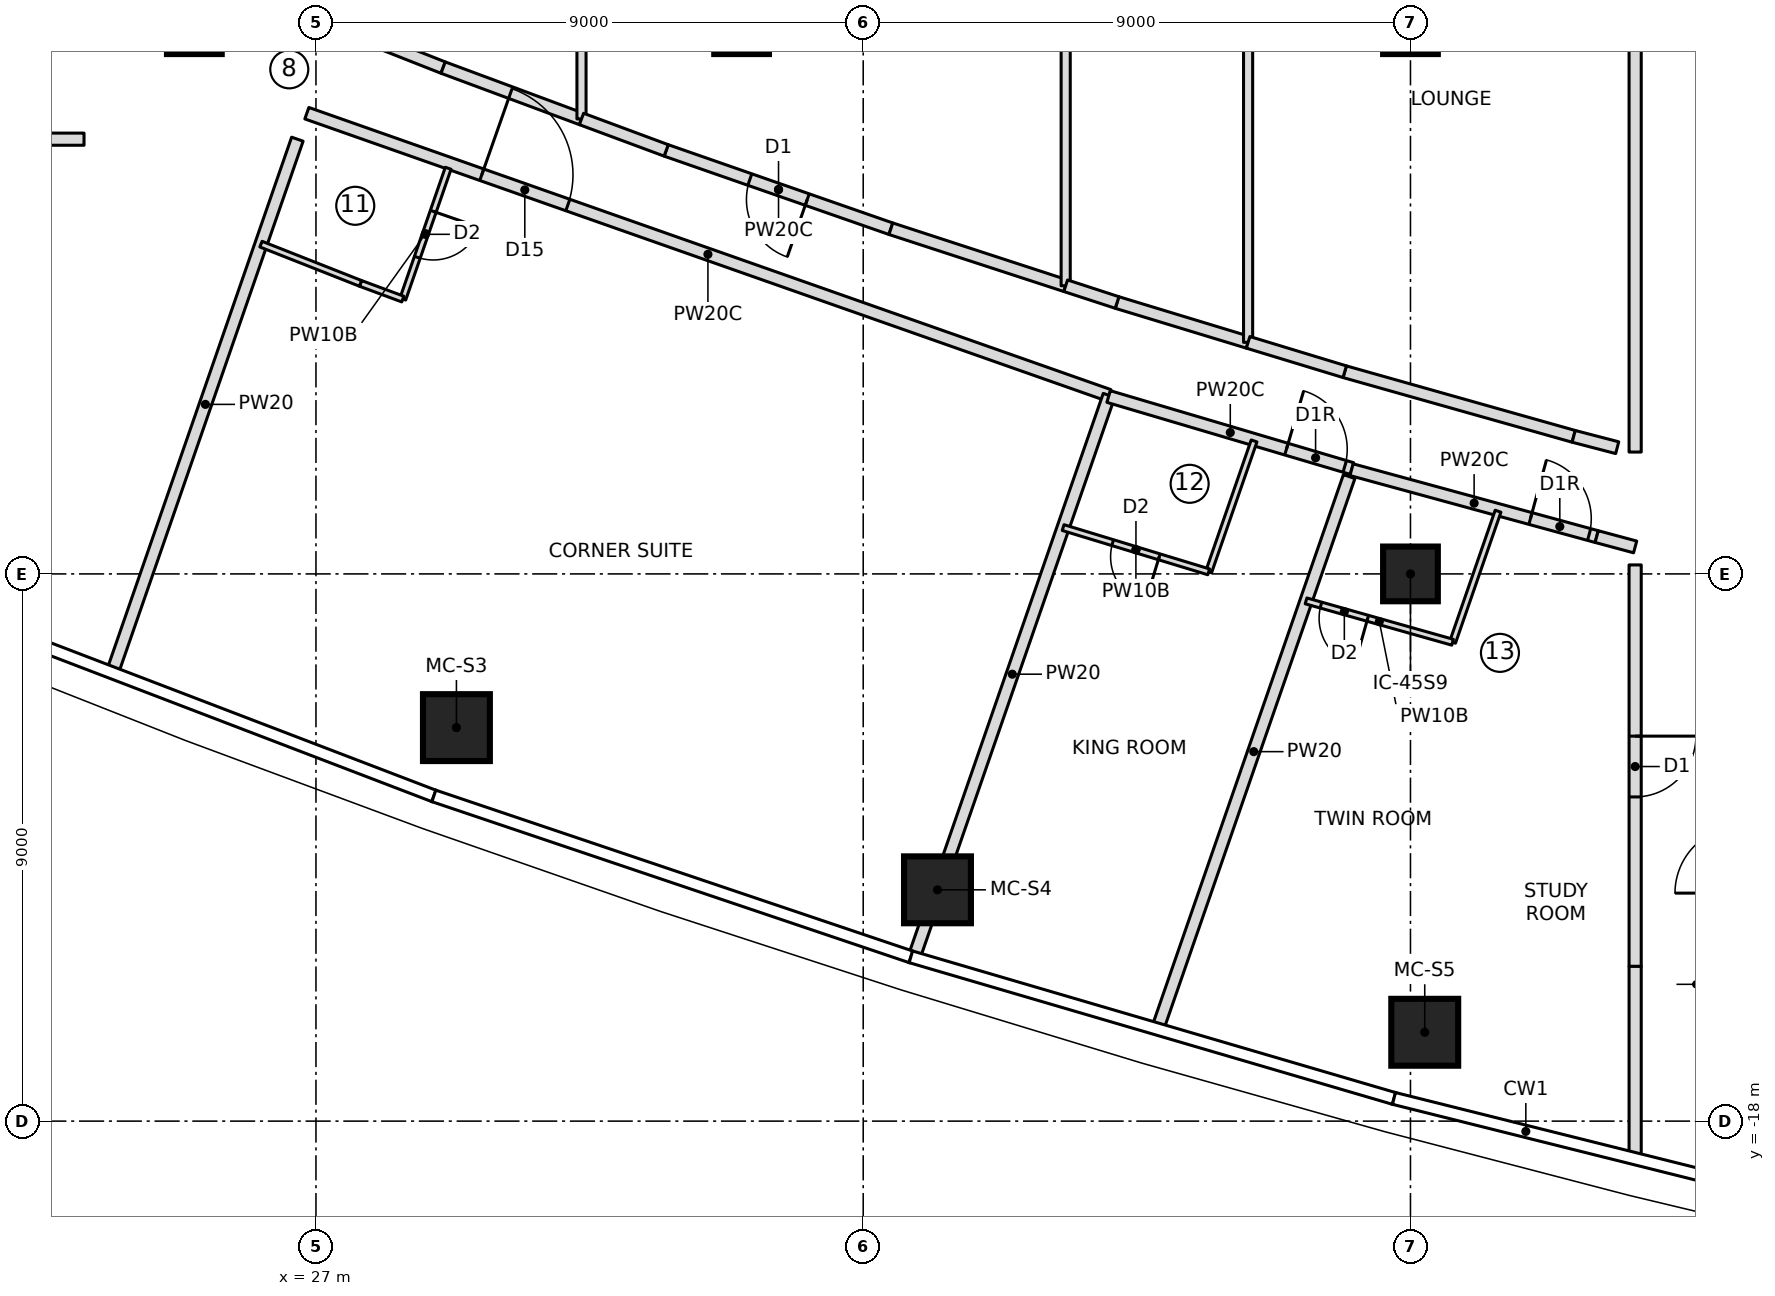
"""IFC4 building model, lengths in metres.
Left out: names, types, materials, properties, quantities, classifications, styles, units other than length and angle.
Written with IfcOpenShell. Run it as: python <this file> out.ifc"""

import sys

from ifc_helpers import new_model, si_unit, direction, frame, frame_2d, origin, origin_2d, place, context, subcontext, project, spatial, rectangle, extrude, element, fill, save


model = new_model("IFC4")
c1 = context("Model", 3, precision=1e-05, world=origin(), true_north=direction((0.0, 1.0)))
c2 = subcontext(c1, "Body", "Model", "MODEL_VIEW")
j1 = project(units=[si_unit("LENGTHUNIT", "METRE"), si_unit("PLANEANGLEUNIT", "RADIAN")], contexts=[c1])
p1 = place(None, origin())
s1 = spatial("IfcSite", under=j1, at=p1, CompositionType="ELEMENT")
p2 = place(p1, origin())
s2 = spatial("IfcBuilding", under=s1, at=p2, CompositionType="ELEMENT")
p3 = place(p2, frame((0.0, 0.0, 267.9)))
s3 = spatial("IfcBuildingStorey", under=s2, at=p3, CompositionType="ELEMENT", Elevation=267.9)
for number, where, z_axis, x_axis in (
    (1, (29.31, -11.528, 0.0), (0.0, 0.0, 1.0), (1.0, 0.0, 0.0)),
    (2, (37.221, -14.196, 0.0), (0.0, 0.0, 1.0), (1.0, 0.0, 0.0)),
    (3, (45.235, -16.539, 0.0), (0.0, 0.0, 1.0), (1.0, 0.0, 0.0)),
):
    element("IfcColumn", number, at=place(p3, frame(where, z_axis=z_axis, x_axis=x_axis)), inside=s3, PredefinedType="COLUMN", context=c2, shape_type="SweptSolid", body=[
        extrude(rectangle(XDim=1.1, YDim=1.1, at=origin_2d()), origin(), (0.0, 0.0, 1.0), 3.55),
    ])
for number, where, z_axis, x_axis in (
    (4, (25.0, 0.0, 0.0), (0.0, 0.0, 1.0), (1.0, 0.0, 0.0)),
    (5, (34.0, 0.0, 0.0), (0.0, 0.0, 1.0), (1.0, 0.0, 0.0)),
    (6, (45.0, -9.0, 0.0), (0.0, 0.0, 1.0), (1.0, 0.0, 0.0)),
    (7, (45.0, 0.0, 0.0), (0.0, 0.0, 1.0), (1.0, 0.0, 0.0)),
):
    element("IfcColumn", number, at=place(p3, frame(where, z_axis=z_axis, x_axis=x_axis)), inside=s3, PredefinedType="COLUMN", context=c2, shape_type="SweptSolid", body=[
        extrude(rectangle(XDim=0.9, YDim=0.9, at=origin_2d()), origin(), (0.0, 0.0, 1.0), 3.55),
    ])
p4 = place(p3, frame((7.287, -1.85, 0.0), z_axis=(0.0, 0.0, 1.0), x_axis=(1.0, 0.0, 0.0)))
e8 = element("IfcWall", 8, at=p4, inside=s3, PredefinedType="PARTITIONING", context=c2, shape_type="SweptSolid", body=[
    extrude(rectangle(XDim=15.899, YDim=0.2, at=frame_2d((7.949, 0.0))), origin(), (0.0, 0.0, 1.0), 3.25),
])
p5 = place(p4, frame((7.624, 0.0, 0.0)))
e9 = element("IfcOpeningElement", 9, at=p5, cuts=e8, PredefinedType="OPENING", context=c2, shape_type="SweptSolid", body=[
    extrude(rectangle(XDim=1.0, YDim=2.1, at=frame_2d((0.5, 1.05))), frame((0.0, 0.11, 0.0), z_axis=(0.0, -1.0, 0.0), x_axis=(1.0, 0.0, 0.0)), (0.0, 0.0, 1.0), 0.22),
])
p6 = place(p3, frame((23.668, -10.573, 0.0), z_axis=(0.0, 0.0, 1.0), x_axis=(0.327714422317, 0.944776829418, 0.0)))
e10 = element("IfcWall", 10, at=p6, inside=s3, PredefinedType="PARTITIONING", context=c2, shape_type="SweptSolid", body=[
    extrude(rectangle(XDim=9.233, YDim=0.2, at=frame_2d((4.617, 0.0))), origin(), (0.0, 0.0, 1.0), 3.25),
])
p7 = place(p3, frame((26.85, -1.423, 0.0), z_axis=(0.0, 0.0, 1.0), x_axis=(0.943328585164, -0.331860182022, 0.0)))
e11 = element("IfcWall", 11, at=p7, inside=s3, PredefinedType="PARTITIONING", context=c2, shape_type="SweptSolid", body=[
    extrude(rectangle(XDim=13.984, YDim=0.2, at=frame_2d((6.992, 0.0))), origin(), (0.0, 0.0, 1.0), 3.25),
])
p8 = place(p7, frame((3.05, 0.0, 0.0)))
e12 = element("IfcOpeningElement", 12, at=p8, cuts=e11, PredefinedType="OPENING", context=c2, shape_type="SweptSolid", body=[
    extrude(rectangle(XDim=1.5, YDim=2.1, at=frame_2d((0.75, 1.05))), frame((0.0, 0.11, 0.0), z_axis=(0.0, -1.0, 0.0), x_axis=(1.0, 0.0, 0.0)), (0.0, 0.0, 1.0), 0.22),
])
p9 = place(p3, frame((29.175, -2.328, 0.0), z_axis=(0.0, 0.0, 1.0), x_axis=(-0.327718024288, -0.944775579996, 0.0)))
e13 = element("IfcWall", 13, at=p9, inside=s3, PredefinedType="PARTITIONING", context=c2, shape_type="SweptSolid", body=[
    extrude(rectangle(XDim=2.277, YDim=0.1, at=frame_2d((1.139, 0.0))), origin(), (0.0, 0.0, 1.0), 3.25),
])
p10 = place(p9, frame((0.75, 0.0, 0.0)))
e14 = element("IfcOpeningElement", 14, at=p10, cuts=e13, PredefinedType="OPENING", context=c2, shape_type="SweptSolid", body=[
    extrude(rectangle(XDim=0.8, YDim=2.1, at=frame_2d((0.4, 1.05))), frame((0.0, 0.06, 0.0), z_axis=(0.0, -1.0, 0.0), x_axis=(1.0, 0.0, 0.0)), (0.0, 0.0, 1.0), 0.12),
])
p11 = place(p3, frame((28.428, -4.48, 0.0), z_axis=(0.0, 0.0, 1.0), x_axis=(-0.937514267289, 0.347946833049, 0.0)))
e15 = element("IfcWall", 15, at=p11, inside=s3, PredefinedType="PARTITIONING", context=c2, shape_type="SweptSolid", body=[
    extrude(rectangle(XDim=0.742, YDim=0.1, at=frame_2d((0.371, 0.0))), origin(), (0.0, 0.0, 1.0), 3.25),
])
p12 = place(p3, frame((27.733, -4.222, 0.0), z_axis=(0.0, 0.0, 1.0), x_axis=(-0.930254925629, 0.366913850028, 0.0)))
e16 = element("IfcWall", 16, at=p12, inside=s3, PredefinedType="PARTITIONING", context=c2, shape_type="SweptSolid", body=[
    extrude(rectangle(XDim=1.76, YDim=0.1, at=frame_2d((0.88, 0.0))), origin(), (0.0, 0.0, 1.0), 3.25),
])
p13 = place(p3, frame((36.861, -15.235, 0.0), z_axis=(0.0, 0.0, 1.0), x_axis=(0.327710853631, 0.944778067279, 0.0)))
e17 = element("IfcWall", 17, at=p13, inside=s3, PredefinedType="PARTITIONING", context=c2, shape_type="SweptSolid", body=[
    extrude(rectangle(XDim=9.707, YDim=0.2, at=frame_2d((4.854, 0.0))), origin(), (0.0, 0.0, 1.0), 3.25),
])
p14 = place(p3, frame((40.035, -6.083, 0.0), z_axis=(0.0, 0.0, 1.0), x_axis=(0.958901312153, -0.283739799027, 0.0)))
e18 = element("IfcWall", 18, at=p14, inside=s3, PredefinedType="PARTITIONING", context=c2, shape_type="SweptSolid", body=[
    extrude(rectangle(XDim=4.174, YDim=0.2, at=frame_2d((2.087, 0.0))), origin(), (0.0, 0.0, 1.0), 3.25),
])
p15 = place(p14, frame((3.05, 0.0, 0.0)))
e19 = element("IfcOpeningElement", 19, at=p15, cuts=e18, PredefinedType="OPENING", context=c2, shape_type="SweptSolid", body=[
    extrude(rectangle(XDim=1.0, YDim=2.1, at=frame_2d((0.5, 1.05))), frame((0.0, 0.11, 0.0), z_axis=(0.0, -1.0, 0.0), x_axis=(1.0, 0.0, 0.0)), (0.0, 0.0, 1.0), 0.22),
])
p16 = place(p3, frame((42.428, -6.813, 0.0), z_axis=(0.0, 0.0, 1.0), x_axis=(-0.327743427431, -0.944766767925, 0.0)))
e20 = element("IfcWall", 20, at=p16, inside=s3, PredefinedType="PARTITIONING", context=c2, shape_type="SweptSolid", body=[
    extrude(rectangle(XDim=2.279, YDim=0.1, at=frame_2d((1.139, 0.0))), origin(), (0.0, 0.0, 1.0), 3.25),
])
p17 = place(p3, frame((41.681, -8.966, 0.0), z_axis=(0.0, 0.0, 1.0), x_axis=(-0.956723503196, 0.290998519638, 0.0)))
e21 = element("IfcWall", 21, at=p17, inside=s3, PredefinedType="PARTITIONING", context=c2, shape_type="SweptSolid", body=[
    extrude(rectangle(XDim=2.502, YDim=0.1, at=frame_2d((1.251, 0.0))), origin(), (0.0, 0.0, 1.0), 3.25),
])
p18 = place(p17, frame((0.85, 0.0, 0.0)))
e22 = element("IfcOpeningElement", 22, at=p18, cuts=e21, PredefinedType="OPENING", context=c2, shape_type="SweptSolid", body=[
    extrude(rectangle(XDim=0.8, YDim=2.1, at=frame_2d((0.4, 1.05))), frame((0.0, 0.06, 0.0), z_axis=(0.0, -1.0, 0.0), x_axis=(1.0, 0.0, 0.0)), (0.0, 0.0, 1.0), 0.12),
])
p19 = place(p3, frame((40.854, -16.447, 0.0), z_axis=(0.0, 0.0, 1.0), x_axis=(0.327714654767, 0.944776748788, 0.0)))
e23 = element("IfcWall", 23, at=p19, inside=s3, PredefinedType="PARTITIONING", context=c2, shape_type="SweptSolid", body=[
    extrude(rectangle(XDim=9.577, YDim=0.2, at=frame_2d((4.788, 0.0))), origin(), (0.0, 0.0, 1.0), 3.25),
])
p20 = place(p3, frame((44.031, -7.286, 0.0), z_axis=(0.0, 0.0, 1.0), x_axis=(0.964708521199, -0.263320088726, 0.0)))
e24 = element("IfcWall", 24, at=p20, inside=s3, PredefinedType="PARTITIONING", context=c2, shape_type="SweptSolid", body=[
    extrude(rectangle(XDim=4.179, YDim=0.2, at=frame_2d((2.089, 0.0))), origin(), (0.0, 0.0, 1.0), 3.25),
])
p21 = place(p20, frame((3.05, 0.0, 0.0)))
e25 = element("IfcOpeningElement", 25, at=p21, cuts=e24, PredefinedType="OPENING", context=c2, shape_type="SweptSolid", body=[
    extrude(rectangle(XDim=1.0, YDim=2.1, at=frame_2d((0.5, 1.05))), frame((0.0, 0.11, 0.0), z_axis=(0.0, -1.0, 0.0), x_axis=(1.0, 0.0, 0.0)), (0.0, 0.0, 1.0), 0.22),
])
p22 = place(p3, frame((46.44, -7.969, 0.0), z_axis=(0.0, 0.0, 1.0), x_axis=(-0.327764902685, -0.944759317799, 0.0)))
e26 = element("IfcWall", 26, at=p22, inside=s3, PredefinedType="PARTITIONING", context=c2, shape_type="SweptSolid", body=[
    extrude(rectangle(XDim=2.281, YDim=0.1, at=frame_2d((1.14, 0.0))), origin(), (0.0, 0.0, 1.0), 3.25),
])
p23 = place(p3, frame((45.693, -10.124, 0.0), z_axis=(0.0, 0.0, 1.0), x_axis=(-0.962409173596, 0.271603723424, 0.0)))
e27 = element("IfcWall", 27, at=p23, inside=s3, PredefinedType="PARTITIONING", context=c2, shape_type="SweptSolid", body=[
    extrude(rectangle(XDim=2.504, YDim=0.1, at=frame_2d((1.252, 0.0))), origin(), (0.0, 0.0, 1.0), 3.25),
])
p24 = place(p23, frame((1.45, 0.0, 0.0)))
e28 = element("IfcOpeningElement", 28, at=p24, cuts=e27, PredefinedType="OPENING", context=c2, shape_type="SweptSolid", body=[
    extrude(rectangle(XDim=0.8, YDim=2.1, at=frame_2d((0.4, 1.05))), frame((0.0, 0.06, 0.0), z_axis=(0.0, -1.0, 0.0), x_axis=(1.0, 0.0, 0.0)), (0.0, 0.0, 1.0), 0.12),
])
p25 = place(p3, frame((29.092, -0.673, 0.0), z_axis=(0.0, 0.0, 1.0), x_axis=(-0.930265251482, 0.366887669302, 0.0)))
e29 = element("IfcWall", 29, at=p25, inside=s3, PredefinedType="PARTITIONING", context=c2, shape_type="SweptSolid", body=[
    extrude(rectangle(XDim=1.834, YDim=0.2, at=frame_2d((0.917, 0.0))), origin(), (0.0, 0.0, 1.0), 3.25),
])
p26 = place(p3, frame((31.367, -1.518, 0.0), z_axis=(0.0, 0.0, 1.0), x_axis=(-0.937481542944, 0.348034993411, 0.0)))
e30 = element("IfcWall", 30, at=p26, inside=s3, PredefinedType="PARTITIONING", context=c2, shape_type="SweptSolid", body=[
    extrude(rectangle(XDim=2.427, YDim=0.2, at=frame_2d((1.214, 0.0))), origin(), (0.0, 0.0, 1.0), 3.25),
])
p27 = place(p3, frame((31.367, -1.518, 0.0), z_axis=(0.0, 0.0, 1.0), x_axis=(0.0, 1.0, 0.0)))
e31 = element("IfcWall", 31, at=p27, inside=s3, PredefinedType="PARTITIONING", context=c2, shape_type="SweptSolid", body=[
    extrude(rectangle(XDim=3.035, YDim=0.15, at=frame_2d((1.518, 0.0))), origin(), (0.0, 0.0, 1.0), 3.25),
])
p28 = place(p3, frame((36.455, -3.323, 0.0), z_axis=(0.0, 0.0, 1.0), x_axis=(-0.944283635062, 0.329132825093, 0.0)))
e32 = element("IfcWall", 32, at=p28, inside=s3, PredefinedType="PARTITIONING", context=c2, shape_type="SweptSolid", body=[
    extrude(rectangle(XDim=3.913, YDim=0.2, at=frame_2d((1.957, 0.0))), origin(), (0.0, 0.0, 1.0), 3.25),
])
p29 = place(p28, frame((1.457, 0.0, 0.0)))
e33 = element("IfcOpeningElement", 33, at=p29, cuts=e32, PredefinedType="OPENING", context=c2, shape_type="SweptSolid", body=[
    extrude(rectangle(XDim=1.0, YDim=2.1, at=frame_2d((0.5, 1.05))), frame((0.0, 0.11, 0.0), z_axis=(0.0, -1.0, 0.0), x_axis=(1.0, 0.0, 0.0)), (0.0, 0.0, 1.0), 0.22),
])
p30 = place(p3, frame((39.33, -4.26, 0.0), z_axis=(0.0, 0.0, 1.0), x_axis=(-0.95070604111, 0.310093572003, 0.0)))
e34 = element("IfcWall", 34, at=p30, inside=s3, PredefinedType="PARTITIONING", context=c2, shape_type="SweptSolid", body=[
    extrude(rectangle(XDim=3.024, YDim=0.2, at=frame_2d((1.512, 0.0))), origin(), (0.0, 0.0, 1.0), 3.25),
])
p31 = place(p3, frame((32.76, -2.035, 0.0), z_axis=(0.0, 0.0, 1.0), x_axis=(-0.93742527201, 0.348186529604, 0.0)))
e35 = element("IfcWall", 35, at=p31, inside=s3, PredefinedType="PARTITIONING", context=c2, shape_type="SweptSolid", body=[
    extrude(rectangle(XDim=1.486, YDim=0.2, at=frame_2d((0.743, 0.0))), origin(), (0.0, 0.0, 1.0), 3.25),
])
p32 = place(p3, frame((39.33, -4.26, 0.0), z_axis=(0.0, 0.0, 1.0), x_axis=(0.0, 1.0, 0.0)))
e36 = element("IfcWall", 36, at=p32, inside=s3, PredefinedType="PARTITIONING", context=c2, shape_type="SweptSolid", body=[
    extrude(rectangle(XDim=8.521, YDim=0.15, at=frame_2d((4.26, 0.0))), origin(), (0.0, 0.0, 1.0), 3.25),
])
p33 = place(p3, frame((42.33, -5.191, 0.0), z_axis=(0.0, 0.0, 1.0), x_axis=(-0.956739496331, 0.290945933396, 0.0)))
e37 = element("IfcWall", 37, at=p33, inside=s3, PredefinedType="PARTITIONING", context=c2, shape_type="SweptSolid", body=[
    extrude(rectangle(XDim=2.252, YDim=0.2, at=frame_2d((1.126, 0.0))), origin(), (0.0, 0.0, 1.0), 3.25),
])
p34 = place(p3, frame((40.175, -4.536, 0.0), z_axis=(0.0, 0.0, 1.0), x_axis=(-0.950722800792, 0.310042184314, 0.0)))
e38 = element("IfcWall", 38, at=p34, inside=s3, PredefinedType="PARTITIONING", context=c2, shape_type="SweptSolid", body=[
    extrude(rectangle(XDim=0.889, YDim=0.2, at=frame_2d((0.444, 0.0))), origin(), (0.0, 0.0, 1.0), 3.25),
])
p35 = place(p3, frame((42.33, -5.191, 0.0), z_axis=(0.0, 0.0, 1.0), x_axis=(0.0, 1.0, 0.0)))
e39 = element("IfcWall", 39, at=p35, inside=s3, PredefinedType="PARTITIONING", context=c2, shape_type="SweptSolid", body=[
    extrude(rectangle(XDim=10.383, YDim=0.15, at=frame_2d((5.191, 0.0))), origin(), (0.0, 0.0, 1.0), 3.25),
])
p36 = place(p3, frame((47.684, -6.738, 0.0), z_axis=(0.0, 0.0, 1.0), x_axis=(-0.962411212211, 0.271596499628, 0.0)))
e40 = element("IfcWall", 40, at=p36, inside=s3, PredefinedType="PARTITIONING", context=c2, shape_type="SweptSolid", body=[
    extrude(rectangle(XDim=3.913, YDim=0.2, at=frame_2d((1.957, 0.0))), origin(), (0.0, 0.0, 1.0), 3.25),
])
p37 = place(p3, frame((43.918, -5.675, 0.0), z_axis=(0.0, 0.0, 1.0), x_axis=(-0.956702361065, 0.291068020115, 0.0)))
e41 = element("IfcWall", 41, at=p37, inside=s3, PredefinedType="PARTITIONING", context=c2, shape_type="SweptSolid", body=[
    extrude(rectangle(XDim=1.661, YDim=0.2, at=frame_2d((0.831, 0.0))), origin(), (0.0, 0.0, 1.0), 3.25),
])
p38 = place(p3, frame((48.4, -6.924, 0.0), z_axis=(0.0, 0.0, 1.0), x_axis=(-0.967585713416, 0.252542842294, 0.0)))
e42 = element("IfcWall", 42, at=p38, inside=s3, PredefinedType="PARTITIONING", context=c2, shape_type="SweptSolid", body=[
    extrude(rectangle(XDim=0.74, YDim=0.2, at=frame_2d((0.37, 0.0))), origin(), (0.0, 0.0, 1.0), 3.25),
])
p39 = place(p3, frame((48.695, -8.852, 0.0), z_axis=(0.0, 0.0, 1.0), x_axis=(0.0, -1.0, 0.0)))
e43 = element("IfcWall", 43, at=p39, inside=s3, PredefinedType="PARTITIONING", context=c2, shape_type="SweptSolid", body=[
    extrude(rectangle(XDim=6.603, YDim=0.2, at=frame_2d((3.302, 0.0))), origin(), (0.0, 0.0, 1.0), 3.25),
])
p40 = place(p39, frame((2.816, 0.0, 0.0)))
e44 = element("IfcOpeningElement", 44, at=p40, cuts=e43, PredefinedType="OPENING", context=c2, shape_type="SweptSolid", body=[
    extrude(rectangle(XDim=1.0, YDim=2.1, at=frame_2d((0.5, 1.05))), frame((0.0, 0.11, 0.0), z_axis=(0.0, -1.0, 0.0), x_axis=(1.0, 0.0, 0.0)), (0.0, 0.0, 1.0), 0.22),
])
p41 = place(p3, frame((48.695, 6.996, 0.0), z_axis=(0.0, 0.0, 1.0), x_axis=(0.0, -1.0, 0.0)))
e45 = element("IfcWall", 45, at=p41, inside=s3, PredefinedType="PARTITIONING", context=c2, shape_type="SweptSolid", body=[
    extrude(rectangle(XDim=13.992, YDim=0.2, at=frame_2d((6.996, 0.0))), origin(), (0.0, 0.0, 1.0), 3.25),
])
p42 = place(p3, frame((48.062, -8.386, 0.0), z_axis=(0.0, 0.0, 1.0), x_axis=(0.965669715173, -0.259772980114, 0.0)))
e46 = element("IfcWall", 46, at=p42, inside=s3, PredefinedType="PARTITIONING", context=c2, shape_type="SweptSolid", body=[
    extrude(rectangle(XDim=0.655, YDim=0.2, at=frame_2d((0.328, 0.0))), origin(), (0.0, 0.0, 1.0), 3.25),
])
p43 = place(p3, frame((48.695, -15.455, 0.0), z_axis=(0.0, 0.0, 1.0), x_axis=(0.0, -1.0, 0.0)))
e47 = element("IfcWall", 47, at=p43, inside=s3, PredefinedType="PARTITIONING", context=c2, shape_type="SweptSolid", body=[
    extrude(rectangle(XDim=3.098, YDim=0.2, at=frame_2d((1.549, 0.0))), origin(), (0.0, 0.0, 1.0), 3.25),
])
p44 = place(p10, origin())
e48 = element("IfcDoor", 48, at=p44, inside=s3, OperationType="SINGLE_SWING_LEFT", PredefinedType="DOOR", context=c2, shape_type="SweptSolid", body=[
    extrude(rectangle(XDim=0.8, YDim=2.1, at=frame_2d((0.4, 1.05))), frame((0.0, 0.025, 0.0), z_axis=(0.0, -1.0, 0.0), x_axis=(1.0, 0.0, 0.0)), (0.0, 0.0, 1.0), 0.05),
])
fill(e14, e48)
p45 = place(p8, origin())
e49 = element("IfcDoor", 49, at=p45, inside=s3, OperationType="DOUBLE_DOOR_SINGLE_SWING", PredefinedType="DOOR", context=c2, shape_type="SweptSolid", body=[
    extrude(rectangle(XDim=1.5, YDim=2.1, at=frame_2d((0.75, 1.05))), frame((0.0, 0.025, 0.0), z_axis=(0.0, -1.0, 0.0), x_axis=(1.0, 0.0, 0.0)), (0.0, 0.0, 1.0), 0.05),
])
fill(e12, e49)
p46 = place(p18, origin())
e50 = element("IfcDoor", 50, at=p46, inside=s3, OperationType="SINGLE_SWING_LEFT", PredefinedType="DOOR", context=c2, shape_type="SweptSolid", body=[
    extrude(rectangle(XDim=0.8, YDim=2.1, at=frame_2d((0.4, 1.05))), frame((0.0, 0.025, 0.0), z_axis=(0.0, -1.0, 0.0), x_axis=(1.0, 0.0, 0.0)), (0.0, 0.0, 1.0), 0.05),
])
fill(e22, e50)
p47 = place(p15, origin())
e51 = element("IfcDoor", 51, at=p47, inside=s3, OperationType="SINGLE_SWING_RIGHT", PredefinedType="DOOR", context=c2, shape_type="SweptSolid", body=[
    extrude(rectangle(XDim=1.0, YDim=2.1, at=frame_2d((0.5, 1.05))), frame((0.0, 0.025, 0.0), z_axis=(0.0, -1.0, 0.0), x_axis=(1.0, 0.0, 0.0)), (0.0, 0.0, 1.0), 0.05),
])
fill(e19, e51)
p48 = place(p24, origin())
e52 = element("IfcDoor", 52, at=p48, inside=s3, OperationType="SINGLE_SWING_LEFT", PredefinedType="DOOR", context=c2, shape_type="SweptSolid", body=[
    extrude(rectangle(XDim=0.8, YDim=2.1, at=frame_2d((0.4, 1.05))), frame((0.0, 0.025, 0.0), z_axis=(0.0, -1.0, 0.0), x_axis=(1.0, 0.0, 0.0)), (0.0, 0.0, 1.0), 0.05),
])
fill(e28, e52)
p49 = place(p21, origin())
e53 = element("IfcDoor", 53, at=p49, inside=s3, OperationType="SINGLE_SWING_RIGHT", PredefinedType="DOOR", context=c2, shape_type="SweptSolid", body=[
    extrude(rectangle(XDim=1.0, YDim=2.1, at=frame_2d((0.5, 1.05))), frame((0.0, 0.025, 0.0), z_axis=(0.0, -1.0, 0.0), x_axis=(1.0, 0.0, 0.0)), (0.0, 0.0, 1.0), 0.05),
])
fill(e25, e53)
p50 = place(p29, origin())
e54 = element("IfcDoor", 54, at=p50, inside=s3, OperationType="SINGLE_SWING_LEFT", PredefinedType="DOOR", context=c2, shape_type="SweptSolid", body=[
    extrude(rectangle(XDim=1.0, YDim=2.1, at=frame_2d((0.5, 1.05))), frame((0.0, 0.025, 0.0), z_axis=(0.0, -1.0, 0.0), x_axis=(1.0, 0.0, 0.0)), (0.0, 0.0, 1.0), 0.05),
])
fill(e33, e54)
p51 = place(p40, origin())
e55 = element("IfcDoor", 55, at=p51, inside=s3, OperationType="SINGLE_SWING_LEFT", PredefinedType="DOOR", context=c2, shape_type="SweptSolid", body=[
    extrude(rectangle(XDim=1.0, YDim=2.1, at=frame_2d((0.5, 1.05))), frame((0.0, 0.025, 0.0), z_axis=(0.0, -1.0, 0.0), x_axis=(1.0, 0.0, 0.0)), (0.0, 0.0, 1.0), 0.05),
])
fill(e44, e55)
save(model, sys.argv[1])
